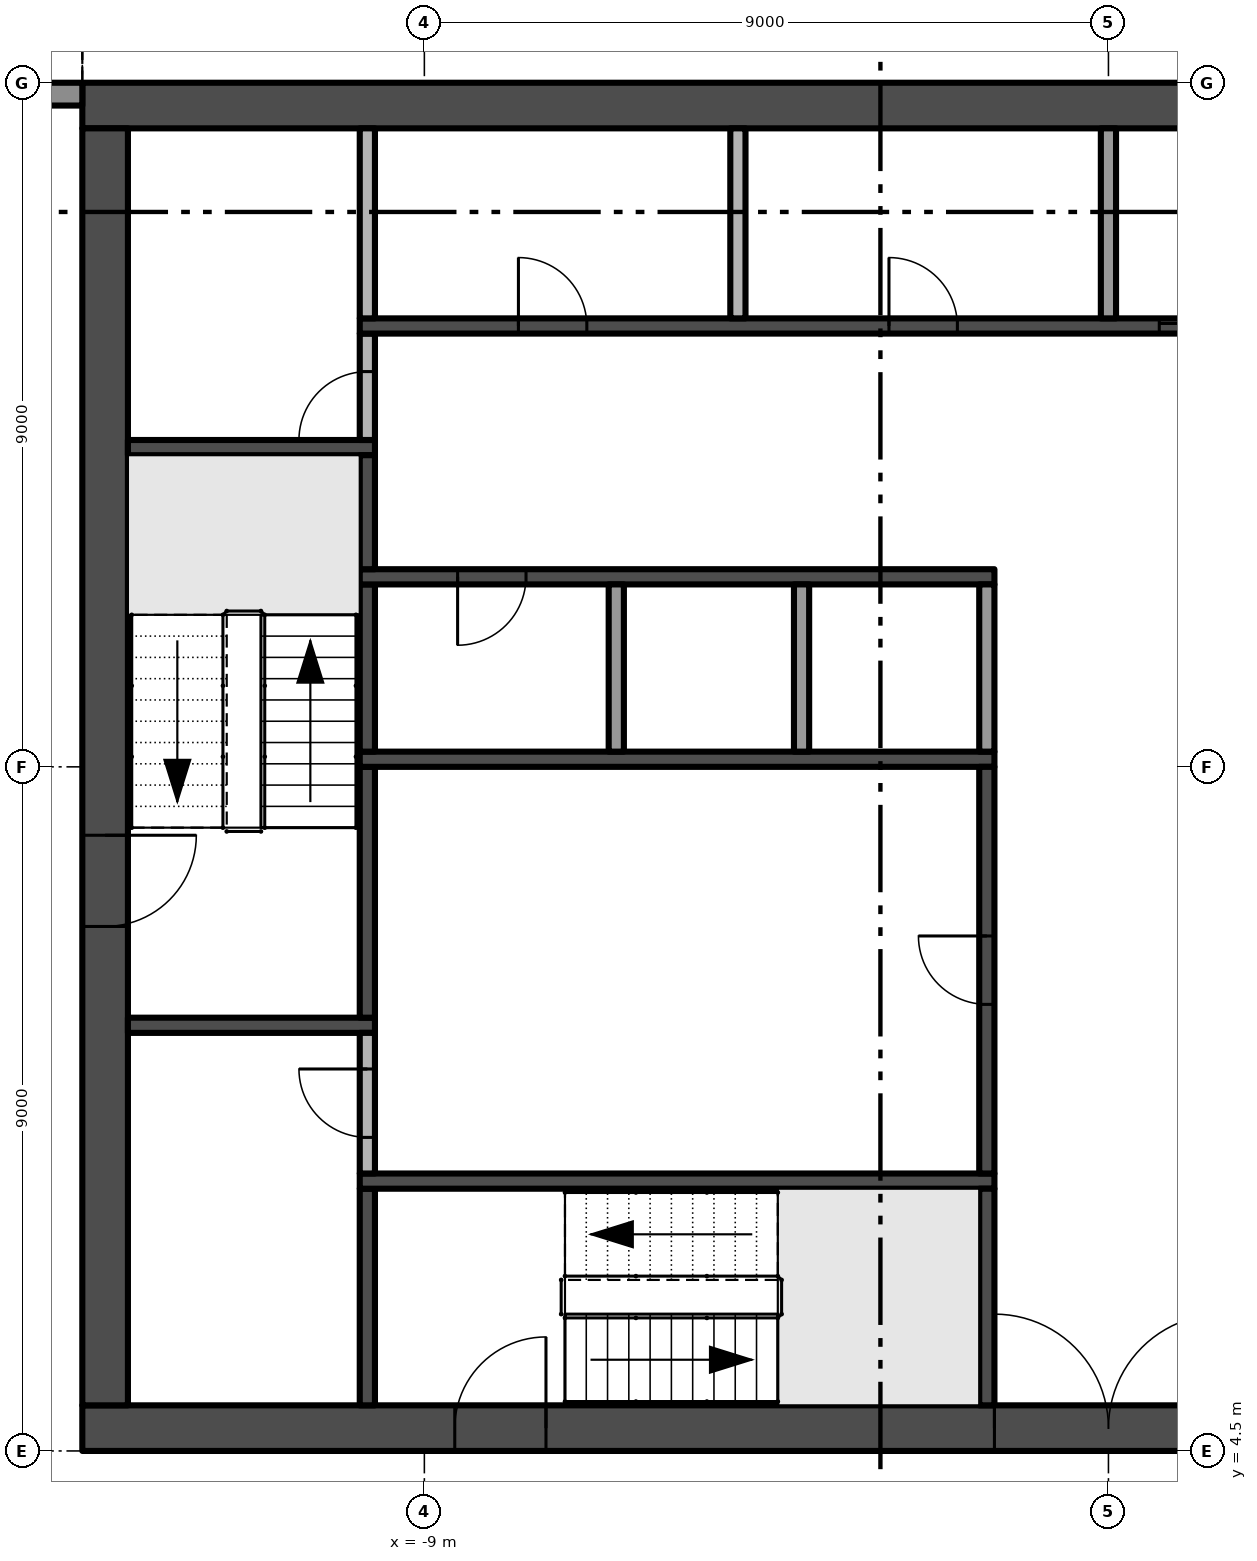
"""IFC4 building model, lengths in metres.
Left out: names, types, materials, properties, quantities, classifications, styles, units other than length and angle.
Written with IfcOpenShell. Run it as: python <this file> out.ifc"""

import sys

from ifc_helpers import new_model, si_unit, direction, frame, frame_2d, origin, place, context, subcontext, project, spatial, polyline, rectangle, outline, extrude, element, fill, save


model = new_model("IFC4")
c1 = context("Model", 3, precision=1e-05, world=origin(), true_north=direction((0.0, 1.0)))
c2 = subcontext(c1, "Body", "Model", "MODEL_VIEW")
j1 = project(units=[si_unit("LENGTHUNIT", "METRE"), si_unit("PLANEANGLEUNIT", "RADIAN")], contexts=[c1])
p1 = place(None, origin())
s1 = spatial("IfcSite", under=j1, at=p1, CompositionType="ELEMENT")
p2 = place(p1, origin())
s2 = spatial("IfcBuilding", under=s1, at=p2, CompositionType="ELEMENT")
p3 = place(p2, frame((0.0, 0.0, 192.0)))
s3 = spatial("IfcBuildingStorey", under=s2, at=p3, CompositionType="ELEMENT", Elevation=192.0)
p4 = place(p3, frame((-13.5, 4.8, -0.3), z_axis=(0.0, 0.0, 1.0), x_axis=(1.0, 0.0, 0.0)))
e1 = element("IfcWall", 1, at=p4, inside=s3, PredefinedType="SHEAR", context=c2, shape_type="SweptSolid", body=[
    extrude(rectangle(XDim=27.0, YDim=0.6, at=frame_2d((13.5, 0.0))), origin(), (0.0, 0.0, 1.0), 3.8),
])
p5 = place(p4, frame((12.0, 0.0, 0.3)))
e2 = element("IfcOpeningElement", 2, at=p5, cuts=e1, PredefinedType="OPENING", context=c2, shape_type="SweptSolid", body=[
    extrude(rectangle(XDim=3.0, YDim=2.4, at=frame_2d((1.5, 1.2))), frame((0.0, 0.31, 0.0), z_axis=(0.0, -1.0, 0.0), x_axis=(1.0, 0.0, 0.0)), (0.0, 0.0, 1.0), 0.62),
])
p6 = place(p4, frame((4.9, 0.0, 0.3)))
e3 = element("IfcOpeningElement", 3, at=p6, cuts=e1, PredefinedType="OPENING", context=c2, shape_type="SweptSolid", body=[
    extrude(rectangle(XDim=1.2, YDim=2.2, at=frame_2d((0.6, 1.1))), frame((0.0, 0.31, 0.0), z_axis=(0.0, -1.0, 0.0), x_axis=(1.0, 0.0, 0.0)), (0.0, 0.0, 1.0), 0.62),
])
p7 = place(p4, frame((20.75, 0.0, 0.3)))
e4 = element("IfcOpeningElement", 4, at=p7, cuts=e1, PredefinedType="OPENING", context=c2, shape_type="SweptSolid", body=[
    extrude(rectangle(XDim=1.5, YDim=2.2, at=frame_2d((0.75, 1.1))), frame((0.0, 0.31, 0.0), z_axis=(0.0, -1.0, 0.0), x_axis=(1.0, 0.0, 0.0)), (0.0, 0.0, 1.0), 0.62),
])
p8 = place(p4, frame((17.4, 0.0, 0.3)))
e5 = element("IfcOpeningElement", 5, at=p8, cuts=e1, PredefinedType="OPENING", context=c2, shape_type="SweptSolid", body=[
    extrude(rectangle(XDim=1.2, YDim=2.2, at=frame_2d((0.6, 1.1))), frame((0.0, 0.31, 0.0), z_axis=(0.0, -1.0, 0.0), x_axis=(1.0, 0.0, 0.0)), (0.0, 0.0, 1.0), 0.62),
])
p9 = place(p3, frame((13.5, 22.2, -0.3), z_axis=(0.0, 0.0, 1.0), x_axis=(-1.0, 0.0, 0.0)))
e6 = element("IfcWall", 6, at=p9, inside=s3, PredefinedType="SHEAR", context=c2, shape_type="SweptSolid", body=[
    extrude(rectangle(XDim=27.0, YDim=0.6, at=frame_2d((13.5, 0.0))), origin(), (0.0, 0.0, 1.0), 3.8),
])
p10 = place(p3, frame((-13.2, 21.9, -0.3), z_axis=(0.0, 0.0, 1.0), x_axis=(0.0, -1.0, 0.0)))
e7 = element("IfcWall", 7, at=p10, inside=s3, PredefinedType="SHEAR", context=c2, shape_type="SweptSolid", body=[
    extrude(rectangle(XDim=16.8, YDim=0.6, at=frame_2d((8.4, 0.0))), origin(), (0.0, 0.0, 1.0), 3.8),
])
p11 = place(p10, frame((9.3, 0.0, 0.3)))
e8 = element("IfcOpeningElement", 8, at=p11, cuts=e7, PredefinedType="OPENING", context=c2, shape_type="SweptSolid", body=[
    extrude(rectangle(XDim=1.2, YDim=2.2, at=frame_2d((0.6, 1.1))), frame((0.0, 0.31, 0.0), z_axis=(0.0, -1.0, 0.0), x_axis=(1.0, 0.0, 0.0)), (0.0, 0.0, 1.0), 0.62),
])
p12 = place(p3, frame((-17.475, 22.35, 0.0), z_axis=(0.0, 0.0, 1.0), x_axis=(1.0, 0.0, 0.0)))
e9 = element("IfcWall", 9, at=p12, inside=s3, PredefinedType="SOLIDWALL", context=c2, shape_type="SweptSolid", body=[
    extrude(rectangle(XDim=3.975, YDim=0.3, at=frame_2d((1.988, 0.0))), origin(), (0.0, 0.0, 1.0), 3.5),
])
p13 = place(p12, frame((0.95, 0.0, 0.0)))
e10 = element("IfcOpeningElement", 10, at=p13, cuts=e9, PredefinedType="OPENING", context=c2, shape_type="SweptSolid", body=[
    extrude(rectangle(XDim=2.4, YDim=2.4, at=frame_2d((1.2, 1.2))), frame((0.0, 0.16, 0.0), z_axis=(0.0, -1.0, 0.0), x_axis=(1.0, 0.0, 0.0)), (0.0, 0.0, 1.0), 0.32),
])
p14 = place(p3, origin())
e11 = element("IfcWall", 11, at=p14, inside=s3, PredefinedType="USERDEFINED", context=c2, shape_type="SweptSolid", body=[
    extrude(outline(polyline([(-13.5, 25.149), (-15.0, 24.488), (-16.5, 23.755), (-18.0, 23.231), (-19.125, 23.1), (-19.5, 23.115), (-21.0, 23.451), (-22.5, 24.112), (-22.601, 23.883), (-21.079, 23.213), (-19.533, 22.866), (-19.115, 22.849), (-17.944, 22.986), (-16.404, 23.524), (-14.895, 24.261), (-13.399, 24.92), (-13.5, 25.149)])), origin(), (0.0, 0.0, 1.0), 0.9),
])
for number, where, z_axis, x_axis in (
    (12, (-12.9, 10.1, 0.0), (0.0, 0.0, 1.0), (1.0, 0.0, 0.0)),
    (13, (-12.9, 17.7, 0.0), (0.0, 0.0, 1.0), (1.0, 0.0, 0.0)),
):
    element("IfcWall", number, at=place(p3, frame(where, z_axis=z_axis, x_axis=x_axis)), inside=s3, PredefinedType="SHEAR", context=c2, shape_type="SweptSolid", body=[
        extrude(rectangle(XDim=3.25, YDim=0.2, at=frame_2d((1.625, 0.0))), origin(), (0.0, 0.0, 1.0), 3.5),
    ])
p15 = place(p3, frame((-9.75, 5.1, 0.0), z_axis=(0.0, 0.0, 1.0), x_axis=(0.0, 1.0, 0.0)))
e14 = element("IfcWall", 14, at=p15, inside=s3, PredefinedType="SHEAR", context=c2, shape_type="SweptSolid", body=[
    extrude(rectangle(XDim=2.85, YDim=0.2, at=frame_2d((1.425, 0.0))), origin(), (0.0, 0.0, 1.0), 3.5),
])
p16 = place(p3, frame((-9.85, 8.05, 0.0), z_axis=(0.0, 0.0, 1.0), x_axis=(1.0, 0.0, 0.0)))
e15 = element("IfcWall", 15, at=p16, inside=s3, PredefinedType="SHEAR", context=c2, shape_type="SweptSolid", body=[
    extrude(rectangle(XDim=8.35, YDim=0.2, at=frame_2d((4.175, 0.0))), origin(), (0.0, 0.0, 1.0), 3.5),
])
p17 = place(p3, frame((-9.75, 8.15, 0.0), z_axis=(0.0, 0.0, 1.0), x_axis=(0.0, 1.0, 0.0)))
e16 = element("IfcWall", 16, at=p17, inside=s3, PredefinedType="PARTITIONING", context=c2, shape_type="SweptSolid", body=[
    extrude(rectangle(XDim=1.85, YDim=0.2, at=frame_2d((0.925, 0.0))), origin(), (0.0, 0.0, 1.0), 3.5),
])
p18 = place(p17, frame((0.475, 0.0, 0.0)))
e17 = element("IfcOpeningElement", 17, at=p18, cuts=e16, PredefinedType="OPENING", context=c2, shape_type="SweptSolid", body=[
    extrude(rectangle(XDim=0.9, YDim=2.1, at=frame_2d((0.45, 1.05))), frame((0.0, 0.11, 0.0), z_axis=(0.0, -1.0, 0.0), x_axis=(1.0, 0.0, 0.0)), (0.0, 0.0, 1.0), 0.22),
])
p19 = place(p3, frame((-9.75, 10.2, 0.0), z_axis=(0.0, 0.0, 1.0), x_axis=(0.0, 1.0, 0.0)))
e18 = element("IfcWall", 18, at=p19, inside=s3, PredefinedType="SHEAR", context=c2, shape_type="SweptSolid", body=[
    extrude(rectangle(XDim=3.3, YDim=0.2, at=frame_2d((1.65, 0.0))), origin(), (0.0, 0.0, 1.0), 3.5),
])
p20 = place(p3, frame((-9.85, 13.6, 0.0), z_axis=(0.0, 0.0, 1.0), x_axis=(1.0, 0.0, 0.0)))
e19 = element("IfcWall", 19, at=p20, inside=s3, PredefinedType="SHEAR", context=c2, shape_type="SweptSolid", body=[
    extrude(rectangle(XDim=8.35, YDim=0.2, at=frame_2d((4.175, 0.0))), origin(), (0.0, 0.0, 1.0), 3.5),
])
p21 = place(p3, frame((-9.75, 13.7, 0.0), z_axis=(0.0, 0.0, 1.0), x_axis=(0.0, 1.0, 0.0)))
e20 = element("IfcWall", 20, at=p21, inside=s3, PredefinedType="SHEAR", context=c2, shape_type="SweptSolid", body=[
    extrude(rectangle(XDim=2.2, YDim=0.2, at=frame_2d((1.1, 0.0))), origin(), (0.0, 0.0, 1.0), 3.5),
])
p22 = place(p3, frame((-1.5, 16.0, 0.0), z_axis=(0.0, 0.0, 1.0), x_axis=(-1.0, 0.0, 0.0)))
e21 = element("IfcWall", 21, at=p22, inside=s3, PredefinedType="SHEAR", context=c2, shape_type="SweptSolid", body=[
    extrude(rectangle(XDim=8.35, YDim=0.2, at=frame_2d((4.175, 0.0))), origin(), (0.0, 0.0, 1.0), 3.5),
])
p23 = place(p22, frame((6.162, 0.0, 0.0)))
e22 = element("IfcOpeningElement", 22, at=p23, cuts=e21, PredefinedType="OPENING", context=c2, shape_type="SweptSolid", body=[
    extrude(rectangle(XDim=0.9, YDim=2.1, at=frame_2d((0.45, 1.05))), frame((0.0, 0.11, 0.0), z_axis=(0.0, -1.0, 0.0), x_axis=(1.0, 0.0, 0.0)), (0.0, 0.0, 1.0), 0.22),
])
p24 = place(p3, frame((-9.75, 16.1, 0.0), z_axis=(0.0, 0.0, 1.0), x_axis=(0.0, 1.0, 0.0)))
e23 = element("IfcWall", 23, at=p24, inside=s3, PredefinedType="SHEAR", context=c2, shape_type="SweptSolid", body=[
    extrude(rectangle(XDim=1.5, YDim=0.2, at=frame_2d((0.75, 0.0))), origin(), (0.0, 0.0, 1.0), 3.5),
])
p25 = place(p3, frame((-9.75, 17.8, 0.0), z_axis=(0.0, 0.0, 1.0), x_axis=(0.0, 1.0, 0.0)))
e24 = element("IfcWall", 24, at=p25, inside=s3, PredefinedType="PARTITIONING", context=c2, shape_type="SweptSolid", body=[
    extrude(rectangle(XDim=1.4, YDim=0.2, at=frame_2d((0.7, 0.0))), origin(), (0.0, 0.0, 1.0), 3.5),
])
p26 = place(p25, origin())
e25 = element("IfcOpeningElement", 25, at=p26, cuts=e24, PredefinedType="OPENING", context=c2, shape_type="SweptSolid", body=[
    extrude(rectangle(XDim=0.9, YDim=2.1, at=frame_2d((0.45, 1.05))), frame((0.0, 0.11, 0.0), z_axis=(0.0, -1.0, 0.0), x_axis=(1.0, 0.0, 0.0)), (0.0, 0.0, 1.0), 0.22),
])
p27 = place(p3, frame((-9.85, 19.3, 0.0), z_axis=(0.0, 0.0, 1.0), x_axis=(1.0, 0.0, 0.0)))
e26 = element("IfcWall", 26, at=p27, inside=s3, PredefinedType="SHEAR", context=c2, shape_type="SweptSolid", body=[
    extrude(rectangle(XDim=19.7, YDim=0.2, at=frame_2d((9.85, 0.0))), origin(), (0.0, 0.0, 1.0), 3.5),
])
p28 = place(p27, frame((10.519, 0.0, 0.0)))
e27 = element("IfcOpeningElement", 27, at=p28, cuts=e26, PredefinedType="OPENING", context=c2, shape_type="SweptSolid", body=[
    extrude(rectangle(XDim=1.1, YDim=2.1, at=frame_2d((0.55, 1.05))), frame((0.0, 0.11, 0.0), z_axis=(0.0, -1.0, 0.0), x_axis=(1.0, 0.0, 0.0)), (0.0, 0.0, 1.0), 0.22),
])
p29 = place(p27, frame((12.956, 0.0, 0.0)))
e28 = element("IfcOpeningElement", 28, at=p29, cuts=e26, PredefinedType="OPENING", context=c2, shape_type="SweptSolid", body=[
    extrude(rectangle(XDim=1.1, YDim=2.1, at=frame_2d((0.55, 1.05))), frame((0.0, 0.11, 0.0), z_axis=(0.0, -1.0, 0.0), x_axis=(1.0, 0.0, 0.0)), (0.0, 0.0, 1.0), 0.22),
])
p30 = place(p27, frame((15.394, 0.0, 0.0)))
e29 = element("IfcOpeningElement", 29, at=p30, cuts=e26, PredefinedType="OPENING", context=c2, shape_type="SweptSolid", body=[
    extrude(rectangle(XDim=1.1, YDim=2.1, at=frame_2d((0.55, 1.05))), frame((0.0, 0.11, 0.0), z_axis=(0.0, -1.0, 0.0), x_axis=(1.0, 0.0, 0.0)), (0.0, 0.0, 1.0), 0.22),
])
p31 = place(p27, frame((17.831, 0.0, 0.0)))
e30 = element("IfcOpeningElement", 30, at=p31, cuts=e26, PredefinedType="OPENING", context=c2, shape_type="SweptSolid", body=[
    extrude(rectangle(XDim=1.1, YDim=2.1, at=frame_2d((0.55, 1.05))), frame((0.0, 0.11, 0.0), z_axis=(0.0, -1.0, 0.0), x_axis=(1.0, 0.0, 0.0)), (0.0, 0.0, 1.0), 0.22),
])
p32 = place(p27, frame((2.087, 0.0, 0.0)))
e31 = element("IfcOpeningElement", 31, at=p32, cuts=e26, PredefinedType="OPENING", context=c2, shape_type="SweptSolid", body=[
    extrude(rectangle(XDim=0.9, YDim=2.1, at=frame_2d((0.45, 1.05))), frame((0.0, 0.11, 0.0), z_axis=(0.0, -1.0, 0.0), x_axis=(1.0, 0.0, 0.0)), (0.0, 0.0, 1.0), 0.22),
])
p33 = place(p27, frame((6.963, 0.0, 0.0)))
e32 = element("IfcOpeningElement", 32, at=p33, cuts=e26, PredefinedType="OPENING", context=c2, shape_type="SweptSolid", body=[
    extrude(rectangle(XDim=0.9, YDim=2.1, at=frame_2d((0.45, 1.05))), frame((0.0, 0.11, 0.0), z_axis=(0.0, -1.0, 0.0), x_axis=(1.0, 0.0, 0.0)), (0.0, 0.0, 1.0), 0.22),
])
p34 = place(p3, frame((-9.75, 19.4, 0.0), z_axis=(0.0, 0.0, 1.0), x_axis=(0.0, 1.0, 0.0)))
e33 = element("IfcWall", 33, at=p34, inside=s3, PredefinedType="PARTITIONING", context=c2, shape_type="SweptSolid", body=[
    extrude(rectangle(XDim=2.5, YDim=0.2, at=frame_2d((1.25, 0.0))), origin(), (0.0, 0.0, 1.0), 3.5),
])
p35 = place(p3, frame((-6.475, 13.7, 0.0), z_axis=(0.0, 0.0, 1.0), x_axis=(0.0, 1.0, 0.0)))
e34 = element("IfcWall", 34, at=p35, inside=s3, PredefinedType="PARTITIONING", context=c2, shape_type="SweptSolid", body=[
    extrude(rectangle(XDim=2.2, YDim=0.2, at=frame_2d((1.1, 0.0))), origin(), (0.0, 0.0, 1.0), 3.5),
])
p36 = place(p3, frame((-4.875, 19.4, 0.0), z_axis=(0.0, 0.0, 1.0), x_axis=(0.0, 1.0, 0.0)))
e35 = element("IfcWall", 35, at=p36, inside=s3, PredefinedType="PARTITIONING", context=c2, shape_type="SweptSolid", body=[
    extrude(rectangle(XDim=2.5, YDim=0.2, at=frame_2d((1.25, 0.0))), origin(), (0.0, 0.0, 1.0), 3.5),
])
p37 = place(p3, frame((-4.037, 13.7, 0.0), z_axis=(0.0, 0.0, 1.0), x_axis=(0.0, 1.0, 0.0)))
e36 = element("IfcWall", 36, at=p37, inside=s3, PredefinedType="PARTITIONING", context=c2, shape_type="SweptSolid", body=[
    extrude(rectangle(XDim=2.2, YDim=0.2, at=frame_2d((1.1, 0.0))), origin(), (0.0, 0.0, 1.0), 3.5),
])
p38 = place(p3, frame((-1.6, 5.1, 0.0), z_axis=(0.0, 0.0, 1.0), x_axis=(0.0, 1.0, 0.0)))
e37 = element("IfcWall", 37, at=p38, inside=s3, PredefinedType="SHEAR", context=c2, shape_type="SweptSolid", body=[
    extrude(rectangle(XDim=2.85, YDim=0.2, at=frame_2d((1.425, 0.0))), origin(), (0.0, 0.0, 1.0), 3.5),
])
p39 = place(p3, frame((-1.6, 8.15, 0.0), z_axis=(0.0, 0.0, 1.0), x_axis=(0.0, 1.0, 0.0)))
e38 = element("IfcWall", 38, at=p39, inside=s3, PredefinedType="SHEAR", context=c2, shape_type="SweptSolid", body=[
    extrude(rectangle(XDim=5.35, YDim=0.2, at=frame_2d((2.675, 0.0))), origin(), (0.0, 0.0, 1.0), 3.5),
])
p40 = place(p39, frame((2.225, 0.0, 0.0)))
e39 = element("IfcOpeningElement", 39, at=p40, cuts=e38, PredefinedType="OPENING", context=c2, shape_type="SweptSolid", body=[
    extrude(rectangle(XDim=0.9, YDim=2.1, at=frame_2d((0.45, 1.05))), frame((0.0, 0.11, 0.0), z_axis=(0.0, -1.0, 0.0), x_axis=(1.0, 0.0, 0.0)), (0.0, 0.0, 1.0), 0.22),
])
p41 = place(p3, frame((-1.6, 13.7, 0.0), z_axis=(0.0, 0.0, 1.0), x_axis=(0.0, 1.0, 0.0)))
e40 = element("IfcWall", 40, at=p41, inside=s3, PredefinedType="PARTITIONING", context=c2, shape_type="SweptSolid", body=[
    extrude(rectangle(XDim=2.2, YDim=0.2, at=frame_2d((1.1, 0.0))), origin(), (0.0, 0.0, 1.0), 3.5),
])
p42 = place(p3, frame((0.0, 19.4, 0.0), z_axis=(0.0, 0.0, 1.0), x_axis=(0.0, 1.0, 0.0)))
e41 = element("IfcWall", 41, at=p42, inside=s3, PredefinedType="PARTITIONING", context=c2, shape_type="SweptSolid", body=[
    extrude(rectangle(XDim=2.5, YDim=0.2, at=frame_2d((1.25, 0.0))), origin(), (0.0, 0.0, 1.0), 3.5),
])
p43 = place(p5, frame((3.0, 0.0, 0.0), z_axis=(0.0, 0.0, 1.0), x_axis=(-1.0, 0.0, 0.0)))
e42 = element("IfcDoor", 42, at=p43, inside=s3, OperationType="DOUBLE_DOOR_SINGLE_SWING", PredefinedType="DOOR", context=c2, shape_type="SweptSolid", body=[
    extrude(rectangle(XDim=3.0, YDim=2.4, at=frame_2d((1.5, 1.2))), frame((0.0, 0.025, 0.0), z_axis=(0.0, -1.0, 0.0), x_axis=(1.0, 0.0, 0.0)), (0.0, 0.0, 1.0), 0.05),
])
fill(e2, e42)
p44 = place(p11, frame((1.2, 0.0, 0.0), z_axis=(0.0, 0.0, 1.0), x_axis=(-1.0, 0.0, 0.0)))
e43 = element("IfcDoor", 43, at=p44, inside=s3, OperationType="SINGLE_SWING_RIGHT", PredefinedType="DOOR", context=c2, shape_type="SweptSolid", body=[
    extrude(rectangle(XDim=1.2, YDim=2.2, at=frame_2d((0.6, 1.1))), frame((0.0, 0.025, 0.0), z_axis=(0.0, -1.0, 0.0), x_axis=(1.0, 0.0, 0.0)), (0.0, 0.0, 1.0), 0.05),
])
fill(e8, e43)
p45 = place(p6, frame((1.2, 0.0, 0.0), z_axis=(0.0, 0.0, 1.0), x_axis=(-1.0, 0.0, 0.0)))
e44 = element("IfcDoor", 44, at=p45, inside=s3, OperationType="SINGLE_SWING_LEFT", PredefinedType="DOOR", context=c2, shape_type="SweptSolid", body=[
    extrude(rectangle(XDim=1.2, YDim=2.2, at=frame_2d((0.6, 1.1))), frame((0.0, 0.025, 0.0), z_axis=(0.0, -1.0, 0.0), x_axis=(1.0, 0.0, 0.0)), (0.0, 0.0, 1.0), 0.05),
])
fill(e3, e44)
p46 = place(p28, origin())
e45 = element("IfcDoor", 45, at=p46, inside=s3, OperationType="SLIDING_TO_RIGHT", PredefinedType="DOOR", context=c2, shape_type="SweptSolid", body=[
    extrude(rectangle(XDim=1.1, YDim=2.1, at=frame_2d((0.55, 1.05))), frame((0.0, 0.025, 0.0), z_axis=(0.0, -1.0, 0.0), x_axis=(1.0, 0.0, 0.0)), (0.0, 0.0, 1.0), 0.05),
])
fill(e27, e45)
p47 = place(p40, origin())
e46 = element("IfcDoor", 46, at=p47, inside=s3, OperationType="SINGLE_SWING_RIGHT", PredefinedType="DOOR", context=c2, shape_type="SweptSolid", body=[
    extrude(rectangle(XDim=0.9, YDim=2.1, at=frame_2d((0.45, 1.05))), frame((0.0, 0.025, 0.0), z_axis=(0.0, -1.0, 0.0), x_axis=(1.0, 0.0, 0.0)), (0.0, 0.0, 1.0), 0.05),
])
fill(e39, e46)
p48 = place(p23, origin())
e47 = element("IfcDoor", 47, at=p48, inside=s3, OperationType="SINGLE_SWING_RIGHT", PredefinedType="DOOR", context=c2, shape_type="SweptSolid", body=[
    extrude(rectangle(XDim=0.9, YDim=2.1, at=frame_2d((0.45, 1.05))), frame((0.0, 0.025, 0.0), z_axis=(0.0, -1.0, 0.0), x_axis=(1.0, 0.0, 0.0)), (0.0, 0.0, 1.0), 0.05),
])
fill(e22, e47)
p49 = place(p26, origin())
e48 = element("IfcDoor", 48, at=p49, inside=s3, OperationType="SINGLE_SWING_LEFT", PredefinedType="DOOR", context=c2, shape_type="SweptSolid", body=[
    extrude(rectangle(XDim=0.9, YDim=2.1, at=frame_2d((0.45, 1.05))), frame((0.0, 0.025, 0.0), z_axis=(0.0, -1.0, 0.0), x_axis=(1.0, 0.0, 0.0)), (0.0, 0.0, 1.0), 0.05),
])
fill(e25, e48)
p50 = place(p32, origin())
e49 = element("IfcDoor", 49, at=p50, inside=s3, OperationType="SINGLE_SWING_LEFT", PredefinedType="DOOR", context=c2, shape_type="SweptSolid", body=[
    extrude(rectangle(XDim=0.9, YDim=2.1, at=frame_2d((0.45, 1.05))), frame((0.0, 0.025, 0.0), z_axis=(0.0, -1.0, 0.0), x_axis=(1.0, 0.0, 0.0)), (0.0, 0.0, 1.0), 0.05),
])
fill(e31, e49)
p51 = place(p33, origin())
e50 = element("IfcDoor", 50, at=p51, inside=s3, OperationType="SINGLE_SWING_LEFT", PredefinedType="DOOR", context=c2, shape_type="SweptSolid", body=[
    extrude(rectangle(XDim=0.9, YDim=2.1, at=frame_2d((0.45, 1.05))), frame((0.0, 0.025, 0.0), z_axis=(0.0, -1.0, 0.0), x_axis=(1.0, 0.0, 0.0)), (0.0, 0.0, 1.0), 0.05),
])
fill(e32, e50)
p52 = place(p18, origin())
e51 = element("IfcDoor", 51, at=p52, inside=s3, OperationType="SINGLE_SWING_RIGHT", PredefinedType="DOOR", context=c2, shape_type="SweptSolid", body=[
    extrude(rectangle(XDim=0.9, YDim=2.1, at=frame_2d((0.45, 1.05))), frame((0.0, 0.025, 0.0), z_axis=(0.0, -1.0, 0.0), x_axis=(1.0, 0.0, 0.0)), (0.0, 0.0, 1.0), 0.05),
])
fill(e17, e51)
save(model, sys.argv[1])
